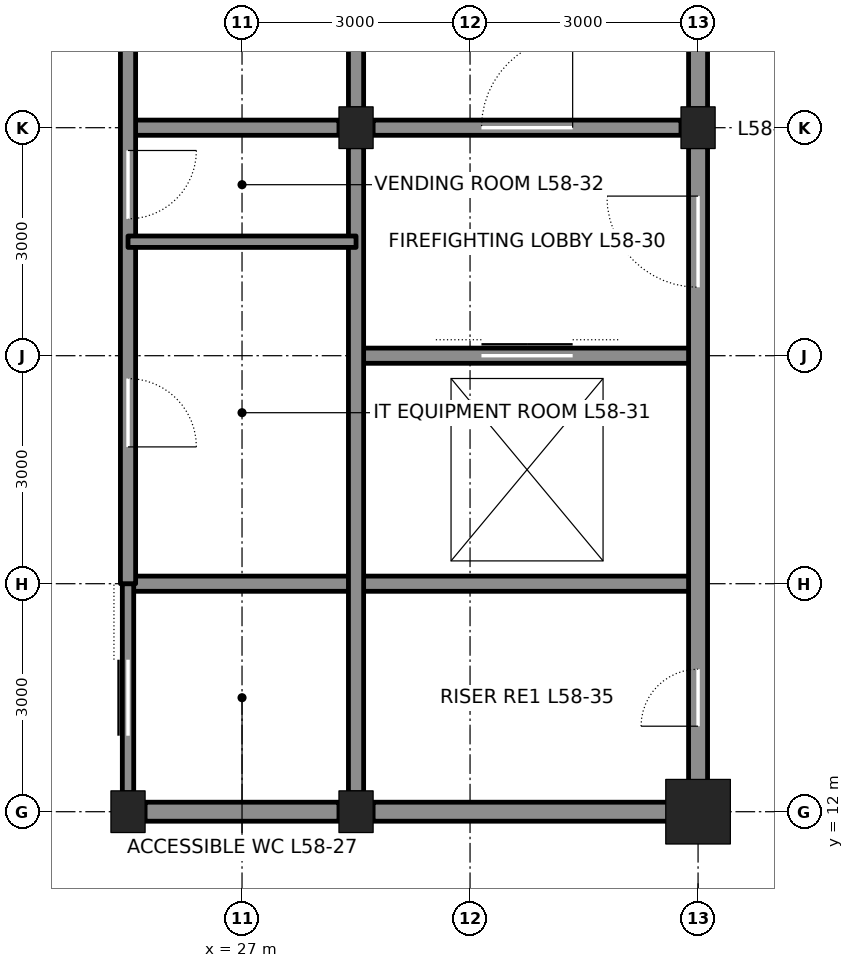
"""IFC4 building model, lengths in metres.
Left out: names, types, materials, properties, quantities, classifications, styles, units other than length and angle.
Written with IfcOpenShell. Run it as: python <this file> out.ifc"""

import sys

from ifc_helpers import new_model, si_unit, direction, frame, frame_2d, origin, origin_2d, place, context, subcontext, project, spatial, rectangle, hollow_rectangle, i_section, extrude, element, fill, save


model = new_model("IFC4")
c1 = context("Model", 3, precision=1e-05, world=origin(), true_north=direction((0.0, 1.0)))
c2 = subcontext(c1, "Body", "Model", "MODEL_VIEW")
j1 = project(units=[si_unit("LENGTHUNIT", "METRE"), si_unit("PLANEANGLEUNIT", "RADIAN")], contexts=[c1])
p1 = place(None, origin())
s1 = spatial("IfcSite", under=j1, at=p1, CompositionType="ELEMENT")
p2 = place(p1, origin())
s2 = spatial("IfcBuilding", under=s1, at=p2, CompositionType="ELEMENT")
p3 = place(p2, frame((0.0, 0.0, 262.2)))
s3 = spatial("IfcBuildingStorey", under=s2, at=p3, CompositionType="ELEMENT", Elevation=262.2)
for number, where, z_axis, x_axis in (
    (1, (25.5, 12.0, 0.0), (0.0, 0.0, 1.0), (1.0, 0.0, 0.0)),
    (2, (28.5, 12.0, 0.0), (0.0, 0.0, 1.0), (1.0, 0.0, 0.0)),
):
    element("IfcColumn", number, at=place(p3, frame(where, z_axis=z_axis, x_axis=x_axis)), inside=s3, PredefinedType="COLUMN", context=c2, shape_type="SweptSolid", body=[
        extrude(i_section(OverallWidth=0.449, OverallDepth=0.549, WebThickness=0.072, FlangeThickness=0.115, at=origin_2d()), origin(), (0.0, 0.0, 1.0), 4.2),
    ])
p4 = place(p3, frame((33.0, 12.0, 0.0), z_axis=(0.0, 0.0, 1.0), x_axis=(1.0, 0.0, 0.0)))
e3 = element("IfcColumn", 3, at=p4, inside=s3, PredefinedType="COLUMN", context=c2, shape_type="SweptSolid", body=[
    extrude(hollow_rectangle(XDim=0.85, YDim=0.85, WallThickness=0.085, at=origin_2d()), origin(), (0.0, 0.0, 1.0), 4.2),
])
for number, where, z_axis, x_axis in (
    (4, (33.0, 21.0, 0.0), (0.0, 0.0, 1.0), (1.0, 0.0, 0.0)),
    (5, (28.5, 21.0, 0.0), (0.0, 0.0, 1.0), (1.0, 0.0, 0.0)),
):
    element("IfcColumn", number, at=place(p3, frame(where, z_axis=z_axis, x_axis=x_axis)), inside=s3, PredefinedType="COLUMN", context=c2, shape_type="SweptSolid", body=[
        extrude(i_section(OverallWidth=0.449, OverallDepth=0.549, WebThickness=0.072, FlangeThickness=0.115, at=origin_2d()), origin(), (0.0, 0.0, 1.0), 4.2),
    ])
p5 = place(p3, frame((25.725, 12.0, 0.0), z_axis=(0.0, 0.0, 1.0), x_axis=(1.0, 0.0, 0.0)))
e6 = element("IfcWall", 6, at=p5, inside=s3, PredefinedType="SOLIDWALL", context=c2, shape_type="SweptSolid", body=[
    extrude(rectangle(XDim=2.55, YDim=0.25, at=frame_2d((1.275, 0.0))), origin(), (0.0, 0.0, 1.0), 3.182),
])
p6 = place(p3, frame((28.725, 12.0, 0.0), z_axis=(0.0, 0.0, 1.0), x_axis=(1.0, 0.0, 0.0)))
e7 = element("IfcWall", 7, at=p6, inside=s3, PredefinedType="SOLIDWALL", context=c2, shape_type="SweptSolid", body=[
    extrude(rectangle(XDim=4.025, YDim=0.25, at=frame_2d((2.013, 0.0))), origin(), (0.0, 0.0, 1.0), 3.182),
])
p7 = place(p3, frame((25.5, 15.0, 0.0), z_axis=(0.0, 0.0, 1.0), x_axis=(1.0, 0.0, 0.0)))
e8 = element("IfcWall", 8, at=p7, inside=s3, PredefinedType="SOLIDWALL", context=c2, shape_type="SweptSolid", body=[
    extrude(rectangle(XDim=7.5, YDim=0.2, at=frame_2d((3.75, 0.0))), origin(), (0.0, 0.0, 1.0), 4.04),
])
p8 = place(p3, frame((28.5, 18.0, 0.0), z_axis=(0.0, 0.0, 1.0), x_axis=(1.0, 0.0, 0.0)))
e9 = element("IfcWall", 9, at=p8, inside=s3, PredefinedType="SOLIDWALL", context=c2, shape_type="SweptSolid", body=[
    extrude(rectangle(XDim=4.5, YDim=0.2, at=frame_2d((2.25, 0.0))), origin(), (0.0, 0.0, 1.0), 4.04),
])
p9 = place(p8, frame((1.65, 0.0, 0.0)))
e10 = element("IfcOpeningElement", 10, at=p9, cuts=e9, PredefinedType="OPENING", context=c2, shape_type="SweptSolid", body=[
    extrude(rectangle(XDim=1.2, YDim=2.1, at=frame_2d((0.6, 1.05))), frame((0.0, 0.11, 0.0), z_axis=(0.0, -1.0, 0.0), x_axis=(1.0, 0.0, 0.0)), (0.0, 0.0, 1.0), 0.22),
])
p10 = place(p3, frame((25.5, 21.0, 0.0), z_axis=(0.0, 0.0, 1.0), x_axis=(1.0, 0.0, 0.0)))
e11 = element("IfcWall", 11, at=p10, inside=s3, PredefinedType="SOLIDWALL", context=c2, shape_type="SweptSolid", body=[
    extrude(rectangle(XDim=2.775, YDim=0.2, at=frame_2d((1.388, 0.0))), origin(), (0.0, 0.0, 1.0), 3.09),
])
p11 = place(p3, frame((28.725, 21.0, 0.0), z_axis=(0.0, 0.0, 1.0), x_axis=(1.0, 0.0, 0.0)))
e12 = element("IfcWall", 12, at=p11, inside=s3, PredefinedType="SOLIDWALL", context=c2, shape_type="SweptSolid", body=[
    extrude(rectangle(XDim=4.05, YDim=0.2, at=frame_2d((2.025, 0.0))), origin(), (0.0, 0.0, 1.0), 3.09),
])
p12 = place(p11, frame((1.425, 0.0, 0.0)))
e13 = element("IfcOpeningElement", 13, at=p12, cuts=e12, PredefinedType="OPENING", context=c2, shape_type="SweptSolid", body=[
    extrude(rectangle(XDim=1.2, YDim=2.1, at=frame_2d((0.6, 1.05))), frame((0.0, 0.11, 0.0), z_axis=(0.0, -1.0, 0.0), x_axis=(1.0, 0.0, 0.0)), (0.0, 0.0, 1.0), 0.22),
])
p13 = place(p3, frame((25.5, 12.25, 0.0), z_axis=(0.0, 0.0, 1.0), x_axis=(0.0, 1.0, 0.0)))
e14 = element("IfcWall", 14, at=p13, inside=s3, PredefinedType="PARTITIONING", context=c2, shape_type="SweptSolid", body=[
    extrude(rectangle(XDim=2.75, YDim=0.15, at=frame_2d((1.375, 0.0))), origin(), (0.0, 0.0, 1.0), 3.065),
])
p14 = place(p13, frame((0.75, 0.0, 0.0)))
e15 = element("IfcOpeningElement", 15, at=p14, cuts=e14, PredefinedType="OPENING", context=c2, shape_type="SweptSolid", body=[
    extrude(rectangle(XDim=1.0, YDim=2.1, at=frame_2d((0.5, 1.05))), frame((0.0, 0.085, 0.0), z_axis=(0.0, -1.0, 0.0), x_axis=(1.0, 0.0, 0.0)), (0.0, 0.0, 1.0), 0.17),
])
p15 = place(p3, frame((25.5, 15.0, 0.0), z_axis=(0.0, 0.0, 1.0), x_axis=(0.0, 1.0, 0.0)))
e16 = element("IfcWall", 16, at=p15, inside=s3, PredefinedType="SOLIDWALL", context=c2, shape_type="SweptSolid", body=[
    extrude(rectangle(XDim=12.0, YDim=0.2, at=frame_2d((6.0, 0.0))), origin(), (0.0, 0.0, 1.0), 3.065),
])
p16 = place(p15, frame((1.8, 0.0, 0.0)))
e17 = element("IfcOpeningElement", 17, at=p16, cuts=e16, PredefinedType="OPENING", context=c2, shape_type="SweptSolid", body=[
    extrude(rectangle(XDim=0.9, YDim=2.1, at=frame_2d((0.45, 1.05))), frame((0.0, 0.11, 0.0), z_axis=(0.0, -1.0, 0.0), x_axis=(1.0, 0.0, 0.0)), (0.0, 0.0, 1.0), 0.22),
])
p17 = place(p15, frame((4.8, 0.0, 0.0)))
e18 = element("IfcOpeningElement", 18, at=p17, cuts=e16, PredefinedType="OPENING", context=c2, shape_type="SweptSolid", body=[
    extrude(rectangle(XDim=0.9, YDim=2.1, at=frame_2d((0.45, 1.05))), frame((0.0, 0.11, 0.0), z_axis=(0.0, -1.0, 0.0), x_axis=(1.0, 0.0, 0.0)), (0.0, 0.0, 1.0), 0.22),
])
p18 = place(p3, frame((28.5, 12.25, 0.0), z_axis=(0.0, 0.0, 1.0), x_axis=(0.0, 1.0, 0.0)))
e19 = element("IfcWall", 19, at=p18, inside=s3, PredefinedType="SOLIDWALL", context=c2, shape_type="SweptSolid", body=[
    extrude(rectangle(XDim=8.5, YDim=0.2, at=frame_2d((4.25, 0.0))), origin(), (0.0, 0.0, 1.0), 3.113),
])
p19 = place(p3, frame((28.5, 21.25, 0.0), z_axis=(0.0, 0.0, 1.0), x_axis=(0.0, 1.0, 0.0)))
e20 = element("IfcWall", 20, at=p19, inside=s3, PredefinedType="SOLIDWALL", context=c2, shape_type="SweptSolid", body=[
    extrude(rectangle(XDim=2.5, YDim=0.2, at=frame_2d((1.25, 0.0))), origin(), (0.0, 0.0, 1.0), 3.113),
])
p20 = place(p3, frame((33.0, 12.25, 0.0), z_axis=(0.0, 0.0, 1.0), x_axis=(0.0, 1.0, 0.0)))
e21 = element("IfcWall", 21, at=p20, inside=s3, PredefinedType="SOLIDWALL", context=c2, shape_type="SweptSolid", body=[
    extrude(rectangle(XDim=8.5, YDim=0.25, at=frame_2d((4.25, 0.0))), origin(), (0.0, 0.0, 1.0), 3.113),
])
p21 = place(p20, frame((6.65, 0.0, 0.0)))
e22 = element("IfcOpeningElement", 22, at=p21, cuts=e21, PredefinedType="OPENING", context=c2, shape_type="SweptSolid", body=[
    extrude(rectangle(XDim=1.2, YDim=2.1, at=frame_2d((0.6, 1.05))), frame((0.0, 0.135, 0.0), z_axis=(0.0, -1.0, 0.0), x_axis=(1.0, 0.0, 0.0)), (0.0, 0.0, 1.0), 0.27),
])
p22 = place(p20, frame((0.875, 0.0, 0.0)))
e23 = element("IfcOpeningElement", 23, at=p22, cuts=e21, PredefinedType="OPENING", context=c2, shape_type="SweptSolid", body=[
    extrude(rectangle(XDim=0.75, YDim=2.1, at=frame_2d((0.375, 1.05))), frame((0.0, 0.135, 0.0), z_axis=(0.0, -1.0, 0.0), x_axis=(1.0, 0.0, 0.0)), (0.0, 0.0, 1.0), 0.27),
])
p23 = place(p3, frame((33.0, 21.25, 0.0), z_axis=(0.0, 0.0, 1.0), x_axis=(0.0, 1.0, 0.0)))
e24 = element("IfcWall", 24, at=p23, inside=s3, PredefinedType="SOLIDWALL", context=c2, shape_type="SweptSolid", body=[
    extrude(rectangle(XDim=2.5, YDim=0.25, at=frame_2d((1.25, 0.0))), origin(), (0.0, 0.0, 1.0), 3.113),
])
p24 = place(p3, frame((25.5, 19.5, 0.0), z_axis=(0.0, 0.0, 1.0), x_axis=(1.0, 0.0, 0.0)))
e25 = element("IfcWall", 25, at=p24, inside=s3, PredefinedType="PARTITIONING", context=c2, shape_type="SweptSolid", body=[
    extrude(rectangle(XDim=3.0, YDim=0.15, at=frame_2d((1.5, 0.0))), origin(), (0.0, 0.0, 1.0), 4.04),
])
p25 = place(p12, origin())
e26 = element("IfcDoor", 26, at=p25, inside=s3, OperationType="SINGLE_SWING_RIGHT", PredefinedType="DOOR", context=c2, shape_type="SweptSolid", body=[
    extrude(rectangle(XDim=1.2, YDim=2.1, at=frame_2d((0.6, 1.05))), frame((0.0, 0.025, 0.0), z_axis=(0.0, -1.0, 0.0), x_axis=(1.0, 0.0, 0.0)), (0.0, 0.0, 1.0), 0.05),
])
fill(e13, e26)
p26 = place(p21, origin())
e27 = element("IfcDoor", 27, at=p26, inside=s3, OperationType="SINGLE_SWING_RIGHT", PredefinedType="DOOR", context=c2, shape_type="SweptSolid", body=[
    extrude(rectangle(XDim=1.2, YDim=2.1, at=frame_2d((0.6, 1.05))), frame((0.0, 0.025, 0.0), z_axis=(0.0, -1.0, 0.0), x_axis=(1.0, 0.0, 0.0)), (0.0, 0.0, 1.0), 0.05),
])
fill(e22, e27)
p27 = place(p9, origin())
e28 = element("IfcDoor", 28, at=p27, inside=s3, OperationType="DOUBLE_DOOR_SLIDING", PredefinedType="DOOR", context=c2, shape_type="SweptSolid", body=[
    extrude(rectangle(XDim=1.2, YDim=2.1, at=frame_2d((0.6, 1.05))), frame((0.0, 0.025, 0.0), z_axis=(0.0, -1.0, 0.0), x_axis=(1.0, 0.0, 0.0)), (0.0, 0.0, 1.0), 0.05),
])
fill(e10, e28)
p28 = place(p22, origin())
e29 = element("IfcDoor", 29, at=p28, inside=s3, OperationType="SINGLE_SWING_LEFT", PredefinedType="DOOR", context=c2, shape_type="SweptSolid", body=[
    extrude(rectangle(XDim=0.75, YDim=2.1, at=frame_2d((0.375, 1.05))), frame((0.0, 0.025, 0.0), z_axis=(0.0, -1.0, 0.0), x_axis=(1.0, 0.0, 0.0)), (0.0, 0.0, 1.0), 0.05),
])
fill(e23, e29)
p29 = place(p14, origin())
e30 = element("IfcDoor", 30, at=p29, inside=s3, OperationType="SLIDING_TO_LEFT", PredefinedType="DOOR", context=c2, shape_type="SweptSolid", body=[
    extrude(rectangle(XDim=1.0, YDim=2.1, at=frame_2d((0.5, 1.05))), frame((0.0, 0.025, 0.0), z_axis=(0.0, -1.0, 0.0), x_axis=(1.0, 0.0, 0.0)), (0.0, 0.0, 1.0), 0.05),
])
fill(e15, e30)
p30 = place(p16, frame((0.9, 0.0, 0.0), z_axis=(0.0, 0.0, 1.0), x_axis=(-1.0, 0.0, 0.0)))
e31 = element("IfcDoor", 31, at=p30, inside=s3, OperationType="SINGLE_SWING_RIGHT", PredefinedType="DOOR", context=c2, shape_type="SweptSolid", body=[
    extrude(rectangle(XDim=0.9, YDim=2.1, at=frame_2d((0.45, 1.05))), frame((0.0, 0.025, 0.0), z_axis=(0.0, -1.0, 0.0), x_axis=(1.0, 0.0, 0.0)), (0.0, 0.0, 1.0), 0.05),
])
fill(e17, e31)
p31 = place(p17, frame((0.9, 0.0, 0.0), z_axis=(0.0, 0.0, 1.0), x_axis=(-1.0, 0.0, 0.0)))
e32 = element("IfcDoor", 32, at=p31, inside=s3, OperationType="SINGLE_SWING_LEFT", PredefinedType="DOOR", context=c2, shape_type="SweptSolid", body=[
    extrude(rectangle(XDim=0.9, YDim=2.1, at=frame_2d((0.45, 1.05))), frame((0.0, 0.025, 0.0), z_axis=(0.0, -1.0, 0.0), x_axis=(1.0, 0.0, 0.0)), (0.0, 0.0, 1.0), 0.05),
])
fill(e18, e32)
save(model, sys.argv[1])
